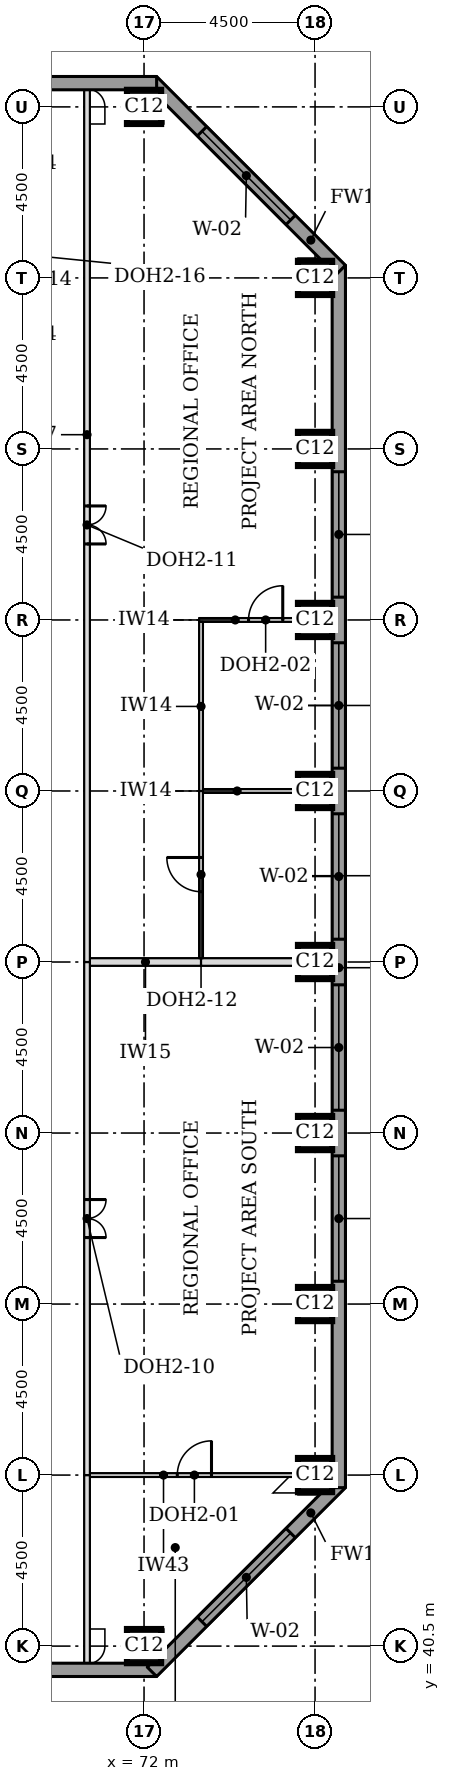
"""IFC4 building model, lengths in metres.
Left out: names, types, materials, properties, quantities, classifications, styles, units other than length and angle.
Written with IfcOpenShell. Run it as: python <this file> out.ifc"""

import sys

from ifc_helpers import new_model, si_unit, direction, frame, frame_2d, origin, origin_2d, place, context, subcontext, project, spatial, rectangle, extrude, element, fill, save


model = new_model("IFC4")
c1 = context("Model", 3, precision=1e-05, world=origin(), true_north=direction((0.0, 1.0)))
c2 = subcontext(c1, "Body", "Model", "MODEL_VIEW")
j1 = project(units=[si_unit("LENGTHUNIT", "METRE"), si_unit("PLANEANGLEUNIT", "RADIAN")], contexts=[c1])
p1 = place(None, origin())
s1 = spatial("IfcSite", under=j1, at=p1, CompositionType="ELEMENT")
p2 = place(p1, origin())
s2 = spatial("IfcBuilding", under=s1, at=p2, CompositionType="ELEMENT")
p3 = place(p2, frame((0.0, 0.0, 158.8)))
s3 = spatial("IfcBuildingStorey", under=s2, at=p3, CompositionType="ELEMENT", Elevation=158.8)
for number, where, z_axis, x_axis in (
    (1, (72.0, 40.5, 0.0), (0.0, 0.0, 1.0), (1.0, 0.0, 0.0)),
    (2, (76.5, 45.0, 0.0), (0.0, 0.0, 1.0), (1.0, 0.0, 0.0)),
    (3, (76.5, 49.5, 0.0), (0.0, 0.0, 1.0), (1.0, 0.0, 0.0)),
    (4, (76.5, 54.0, 0.0), (0.0, 0.0, 1.0), (1.0, 0.0, 0.0)),
    (5, (76.5, 58.5, 0.0), (0.0, 0.0, 1.0), (1.0, 0.0, 0.0)),
    (6, (76.5, 63.0, 0.0), (0.0, 0.0, 1.0), (1.0, 0.0, 0.0)),
    (7, (76.5, 67.5, 0.0), (0.0, 0.0, 1.0), (1.0, 0.0, 0.0)),
    (8, (76.5, 72.0, 0.0), (0.0, 0.0, 1.0), (1.0, 0.0, 0.0)),
    (9, (76.5, 76.5, 0.0), (0.0, 0.0, 1.0), (1.0, 0.0, 0.0)),
    (10, (72.0, 81.0, 0.0), (0.0, 0.0, 1.0), (1.0, 0.0, 0.0)),
):
    element("IfcColumn", number, at=place(p3, frame(where, z_axis=z_axis, x_axis=x_axis)), inside=s3, PredefinedType="COLUMN", context=c2, shape_type="SweptSolid", body=[
        extrude(rectangle(XDim=0.9, YDim=0.9, at=origin_2d()), origin(), (0.0, 0.0, 1.0), 3.7),
    ])
p4 = place(p3, frame((36.0, 39.875, 0.0), z_axis=(0.0, 0.0, 1.0), x_axis=(1.0, 0.0, 0.0)))
e11 = element("IfcWall", 11, at=p4, inside=s3, PredefinedType="STANDARD", context=c2, shape_type="SweptSolid", body=[
    extrude(rectangle(XDim=36.331, YDim=0.35, at=frame_2d((18.166, 0.0))), origin(), (0.0, 0.0, 1.0), 3.525),
])
p5 = place(p4, frame((5.1, 0.0, 0.9)))
e12 = element("IfcOpeningElement", 12, at=p5, cuts=e11, PredefinedType="OPENING", context=c2, shape_type="SweptSolid", body=[
    extrude(rectangle(XDim=3.3, YDim=1.9, at=frame_2d((1.65, 0.95))), frame((0.0, 0.185, 0.0), z_axis=(0.0, -1.0, 0.0), x_axis=(1.0, 0.0, 0.0)), (0.0, 0.0, 1.0), 0.37),
])
p6 = place(p4, frame((9.6, 0.0, 0.9)))
e13 = element("IfcOpeningElement", 13, at=p6, cuts=e11, PredefinedType="OPENING", context=c2, shape_type="SweptSolid", body=[
    extrude(rectangle(XDim=3.3, YDim=1.9, at=frame_2d((1.65, 0.95))), frame((0.0, 0.185, 0.0), z_axis=(0.0, -1.0, 0.0), x_axis=(1.0, 0.0, 0.0)), (0.0, 0.0, 1.0), 0.37),
])
p7 = place(p4, frame((14.1, 0.0, 0.9)))
e14 = element("IfcOpeningElement", 14, at=p7, cuts=e11, PredefinedType="OPENING", context=c2, shape_type="SweptSolid", body=[
    extrude(rectangle(XDim=3.3, YDim=1.9, at=frame_2d((1.65, 0.95))), frame((0.0, 0.185, 0.0), z_axis=(0.0, -1.0, 0.0), x_axis=(1.0, 0.0, 0.0)), (0.0, 0.0, 1.0), 0.37),
])
p8 = place(p4, frame((18.6, 0.0, 0.9)))
e15 = element("IfcOpeningElement", 15, at=p8, cuts=e11, PredefinedType="OPENING", context=c2, shape_type="SweptSolid", body=[
    extrude(rectangle(XDim=3.3, YDim=1.9, at=frame_2d((1.65, 0.95))), frame((0.0, 0.185, 0.0), z_axis=(0.0, -1.0, 0.0), x_axis=(1.0, 0.0, 0.0)), (0.0, 0.0, 1.0), 0.37),
])
p9 = place(p4, frame((23.1, 0.0, 0.9)))
e16 = element("IfcOpeningElement", 16, at=p9, cuts=e11, PredefinedType="OPENING", context=c2, shape_type="SweptSolid", body=[
    extrude(rectangle(XDim=3.3, YDim=1.9, at=frame_2d((1.65, 0.95))), frame((0.0, 0.185, 0.0), z_axis=(0.0, -1.0, 0.0), x_axis=(1.0, 0.0, 0.0)), (0.0, 0.0, 1.0), 0.37),
])
p10 = place(p4, frame((27.6, 0.0, 0.9)))
e17 = element("IfcOpeningElement", 17, at=p10, cuts=e11, PredefinedType="OPENING", context=c2, shape_type="SweptSolid", body=[
    extrude(rectangle(XDim=3.3, YDim=1.9, at=frame_2d((1.65, 0.95))), frame((0.0, 0.185, 0.0), z_axis=(0.0, -1.0, 0.0), x_axis=(1.0, 0.0, 0.0)), (0.0, 0.0, 1.0), 0.37),
])
p11 = place(p3, frame((72.208, 39.824, 0.0), z_axis=(0.0, 0.0, 1.0), x_axis=(0.707106781187, 0.707106781187, 0.0)))
e18 = element("IfcWall", 18, at=p11, inside=s3, PredefinedType="STANDARD", context=c2, shape_type="SweptSolid", body=[
    extrude(rectangle(XDim=7.027, YDim=0.35, at=frame_2d((3.513, 0.0))), origin(), (0.0, 0.0, 1.0), 3.525),
])
p12 = place(p11, frame((1.863, 0.0, 0.9)))
e19 = element("IfcOpeningElement", 19, at=p12, cuts=e18, PredefinedType="OPENING", context=c2, shape_type="SweptSolid", body=[
    extrude(rectangle(XDim=3.3, YDim=1.9, at=frame_2d((1.65, 0.95))), frame((0.0, 0.185, 0.0), z_axis=(0.0, -1.0, 0.0), x_axis=(1.0, 0.0, 0.0)), (0.0, 0.0, 1.0), 0.37),
])
p13 = place(p3, frame((77.125, 44.669, 0.0), z_axis=(0.0, 0.0, 1.0), x_axis=(0.0, 1.0, 0.0)))
e20 = element("IfcWall", 20, at=p13, inside=s3, PredefinedType="STANDARD", context=c2, shape_type="SweptSolid", body=[
    extrude(rectangle(XDim=32.163, YDim=0.35, at=frame_2d((16.081, 0.0))), origin(), (0.0, 0.0, 1.0), 3.525),
])
p14 = place(p13, frame((5.431, 0.0, 0.9)))
e21 = element("IfcOpeningElement", 21, at=p14, cuts=e20, PredefinedType="OPENING", context=c2, shape_type="SweptSolid", body=[
    extrude(rectangle(XDim=3.3, YDim=1.9, at=frame_2d((1.65, 0.95))), frame((0.0, 0.185, 0.0), z_axis=(0.0, -1.0, 0.0), x_axis=(1.0, 0.0, 0.0)), (0.0, 0.0, 1.0), 0.37),
])
p15 = place(p13, frame((9.931, 0.0, 0.9)))
e22 = element("IfcOpeningElement", 22, at=p15, cuts=e20, PredefinedType="OPENING", context=c2, shape_type="SweptSolid", body=[
    extrude(rectangle(XDim=3.3, YDim=1.9, at=frame_2d((1.65, 0.95))), frame((0.0, 0.185, 0.0), z_axis=(0.0, -1.0, 0.0), x_axis=(1.0, 0.0, 0.0)), (0.0, 0.0, 1.0), 0.37),
])
p16 = place(p13, frame((14.431, 0.0, 0.9)))
e23 = element("IfcOpeningElement", 23, at=p16, cuts=e20, PredefinedType="OPENING", context=c2, shape_type="SweptSolid", body=[
    extrude(rectangle(XDim=3.3, YDim=1.9, at=frame_2d((1.65, 0.95))), frame((0.0, 0.185, 0.0), z_axis=(0.0, -1.0, 0.0), x_axis=(1.0, 0.0, 0.0)), (0.0, 0.0, 1.0), 0.37),
])
p17 = place(p13, frame((18.931, 0.0, 0.9)))
e24 = element("IfcOpeningElement", 24, at=p17, cuts=e20, PredefinedType="OPENING", context=c2, shape_type="SweptSolid", body=[
    extrude(rectangle(XDim=3.3, YDim=1.9, at=frame_2d((1.65, 0.95))), frame((0.0, 0.185, 0.0), z_axis=(0.0, -1.0, 0.0), x_axis=(1.0, 0.0, 0.0)), (0.0, 0.0, 1.0), 0.37),
])
p18 = place(p13, frame((23.431, 0.0, 0.9)))
e25 = element("IfcOpeningElement", 25, at=p18, cuts=e20, PredefinedType="OPENING", context=c2, shape_type="SweptSolid", body=[
    extrude(rectangle(XDim=3.3, YDim=1.9, at=frame_2d((1.65, 0.95))), frame((0.0, 0.185, 0.0), z_axis=(0.0, -1.0, 0.0), x_axis=(1.0, 0.0, 0.0)), (0.0, 0.0, 1.0), 0.37),
])
p19 = place(p3, frame((77.176, 76.708, 0.0), z_axis=(0.0, 0.0, 1.0), x_axis=(-0.707106781187, 0.707106781187, 0.0)))
e26 = element("IfcWall", 26, at=p19, inside=s3, PredefinedType="STANDARD", context=c2, shape_type="SweptSolid", body=[
    extrude(rectangle(XDim=7.027, YDim=0.35, at=frame_2d((3.513, 0.0))), origin(), (0.0, 0.0, 1.0), 3.525),
])
p20 = place(p19, frame((1.863, 0.0, 0.9)))
e27 = element("IfcOpeningElement", 27, at=p20, cuts=e26, PredefinedType="OPENING", context=c2, shape_type="SweptSolid", body=[
    extrude(rectangle(XDim=3.3, YDim=1.9, at=frame_2d((1.65, 0.95))), frame((0.0, 0.185, 0.0), z_axis=(0.0, -1.0, 0.0), x_axis=(1.0, 0.0, 0.0)), (0.0, 0.0, 1.0), 0.37),
])
p21 = place(p3, frame((72.331, 81.625, 0.0), z_axis=(0.0, 0.0, 1.0), x_axis=(-1.0, 0.0, 0.0)))
e28 = element("IfcWall", 28, at=p21, inside=s3, PredefinedType="STANDARD", context=c2, shape_type="SweptSolid", body=[
    extrude(rectangle(XDim=32.163, YDim=0.35, at=frame_2d((16.081, 0.0))), origin(), (0.0, 0.0, 1.0), 3.525),
])
p22 = place(p21, frame((5.431, 0.0, 0.9)))
e29 = element("IfcOpeningElement", 29, at=p22, cuts=e28, PredefinedType="OPENING", context=c2, shape_type="SweptSolid", body=[
    extrude(rectangle(XDim=3.3, YDim=1.9, at=frame_2d((1.65, 0.95))), frame((0.0, 0.185, 0.0), z_axis=(0.0, -1.0, 0.0), x_axis=(1.0, 0.0, 0.0)), (0.0, 0.0, 1.0), 0.37),
])
p23 = place(p21, frame((9.931, 0.0, 0.9)))
e30 = element("IfcOpeningElement", 30, at=p23, cuts=e28, PredefinedType="OPENING", context=c2, shape_type="SweptSolid", body=[
    extrude(rectangle(XDim=3.3, YDim=1.9, at=frame_2d((1.65, 0.95))), frame((0.0, 0.185, 0.0), z_axis=(0.0, -1.0, 0.0), x_axis=(1.0, 0.0, 0.0)), (0.0, 0.0, 1.0), 0.37),
])
p24 = place(p21, frame((14.431, 0.0, 0.9)))
e31 = element("IfcOpeningElement", 31, at=p24, cuts=e28, PredefinedType="OPENING", context=c2, shape_type="SweptSolid", body=[
    extrude(rectangle(XDim=3.3, YDim=1.9, at=frame_2d((1.65, 0.95))), frame((0.0, 0.185, 0.0), z_axis=(0.0, -1.0, 0.0), x_axis=(1.0, 0.0, 0.0)), (0.0, 0.0, 1.0), 0.37),
])
p25 = place(p21, frame((18.931, 0.0, 0.9)))
e32 = element("IfcOpeningElement", 32, at=p25, cuts=e28, PredefinedType="OPENING", context=c2, shape_type="SweptSolid", body=[
    extrude(rectangle(XDim=3.3, YDim=1.9, at=frame_2d((1.65, 0.95))), frame((0.0, 0.185, 0.0), z_axis=(0.0, -1.0, 0.0), x_axis=(1.0, 0.0, 0.0)), (0.0, 0.0, 1.0), 0.37),
])
p26 = place(p21, frame((23.431, 0.0, 0.9)))
e33 = element("IfcOpeningElement", 33, at=p26, cuts=e28, PredefinedType="OPENING", context=c2, shape_type="SweptSolid", body=[
    extrude(rectangle(XDim=3.3, YDim=1.9, at=frame_2d((1.65, 0.95))), frame((0.0, 0.185, 0.0), z_axis=(0.0, -1.0, 0.0), x_axis=(1.0, 0.0, 0.0)), (0.0, 0.0, 1.0), 0.37),
])
p27 = place(p3, frame((70.575, 45.0, 0.0), z_axis=(0.0, 0.0, 1.0), x_axis=(1.0, 0.0, 0.0)))
e34 = element("IfcWall", 34, at=p27, inside=s3, PredefinedType="PARTITIONING", context=c2, shape_type="SweptSolid", body=[
    extrude(rectangle(XDim=5.475, YDim=0.1, at=frame_2d((2.738, 0.0))), origin(), (0.0, 0.0, 1.0), 3.096),
])
p28 = place(p27, frame((2.3, 0.0, 0.0)))
e35 = element("IfcOpeningElement", 35, at=p28, cuts=e34, PredefinedType="OPENING", context=c2, shape_type="SweptSolid", body=[
    extrude(rectangle(XDim=0.9, YDim=2.1, at=frame_2d((0.45, 1.05))), frame((0.0, 0.06, 0.0), z_axis=(0.0, -1.0, 0.0), x_axis=(1.0, 0.0, 0.0)), (0.0, 0.0, 1.0), 0.12),
])
p29 = place(p3, frame((70.575, 58.5, 0.0), z_axis=(0.0, 0.0, 1.0), x_axis=(1.0, 0.0, 0.0)))
e36 = element("IfcWall", 36, at=p29, inside=s3, PredefinedType="PARTITIONING", context=c2, shape_type="SweptSolid", body=[
    extrude(rectangle(XDim=2.925, YDim=0.2, at=frame_2d((1.462, 0.0))), origin(), (0.0, 0.0, 1.0), 3.55),
])
p30 = place(p3, frame((73.5, 58.5, 0.0), z_axis=(0.0, 0.0, 1.0), x_axis=(1.0, 0.0, 0.0)))
e37 = element("IfcWall", 37, at=p30, inside=s3, PredefinedType="PARTITIONING", context=c2, shape_type="SweptSolid", body=[
    extrude(rectangle(XDim=3.45, YDim=0.2, at=frame_2d((1.725, 0.0))), origin(), (0.0, 0.0, 1.0), 3.55),
])
p31 = place(p3, frame((73.55, 63.0, 0.0), z_axis=(0.0, 0.0, 1.0), x_axis=(1.0, 0.0, 0.0)))
e38 = element("IfcWall", 38, at=p31, inside=s3, PredefinedType="PARTITIONING", context=c2, shape_type="SweptSolid", body=[
    extrude(rectangle(XDim=3.4, YDim=0.1, at=frame_2d((1.7, 0.0))), origin(), (0.0, 0.0, 1.0), 3.55),
])
p32 = place(p3, frame((73.45, 67.5, 0.0), z_axis=(0.0, 0.0, 1.0), x_axis=(1.0, 0.0, 0.0)))
e39 = element("IfcWall", 39, at=p32, inside=s3, PredefinedType="PARTITIONING", context=c2, shape_type="SweptSolid", body=[
    extrude(rectangle(XDim=3.5, YDim=0.1, at=frame_2d((1.75, 0.0))), origin(), (0.0, 0.0, 1.0), 3.55),
])
p33 = place(p32, frame((1.3, 0.0, 0.0)))
e40 = element("IfcOpeningElement", 40, at=p33, cuts=e39, PredefinedType="OPENING", context=c2, shape_type="SweptSolid", body=[
    extrude(rectangle(XDim=0.9, YDim=2.1, at=frame_2d((0.45, 1.05))), frame((0.0, 0.06, 0.0), z_axis=(0.0, -1.0, 0.0), x_axis=(1.0, 0.0, 0.0)), (0.0, 0.0, 1.0), 0.12),
])
p34 = place(p3, frame((70.5, 40.05, 0.0), z_axis=(0.0, 0.0, 1.0), x_axis=(0.0, 1.0, 0.0)))
e41 = element("IfcWall", 41, at=p34, inside=s3, PredefinedType="PARTITIONING", context=c2, shape_type="SweptSolid", body=[
    extrude(rectangle(XDim=4.95, YDim=0.15, at=frame_2d((2.475, 0.0))), origin(), (0.0, 0.0, 1.0), 3.55),
])
p35 = place(p3, frame((70.5, 45.0, 0.0), z_axis=(0.0, 0.0, 1.0), x_axis=(0.0, 1.0, 0.0)))
e42 = element("IfcWall", 42, at=p35, inside=s3, PredefinedType="PARTITIONING", context=c2, shape_type="SweptSolid", body=[
    extrude(rectangle(XDim=13.5, YDim=0.15, at=frame_2d((6.75, 0.0))), origin(), (0.0, 0.0, 1.0), 3.55),
])
p36 = place(p35, frame((6.25, 0.0, 0.0)))
e43 = element("IfcOpeningElement", 43, at=p36, cuts=e42, PredefinedType="OPENING", context=c2, shape_type="SweptSolid", body=[
    extrude(rectangle(XDim=1.0, YDim=2.1, at=frame_2d((0.5, 1.05))), frame((0.0, 0.085, 0.0), z_axis=(0.0, -1.0, 0.0), x_axis=(1.0, 0.0, 0.0)), (0.0, 0.0, 1.0), 0.17),
])
p37 = place(p3, frame((70.5, 58.5, 0.0), z_axis=(0.0, 0.0, 1.0), x_axis=(0.0, 1.0, 0.0)))
e44 = element("IfcWall", 44, at=p37, inside=s3, PredefinedType="PARTITIONING", context=c2, shape_type="SweptSolid", body=[
    extrude(rectangle(XDim=22.95, YDim=0.15, at=frame_2d((11.475, 0.0))), origin(), (0.0, 0.0, 1.0), 3.55),
])
p38 = place(p37, frame((11.0, 0.0, 0.0)))
e45 = element("IfcOpeningElement", 45, at=p38, cuts=e44, PredefinedType="OPENING", context=c2, shape_type="SweptSolid", body=[
    extrude(rectangle(XDim=1.0, YDim=2.1, at=frame_2d((0.5, 1.05))), frame((0.0, 0.085, 0.0), z_axis=(0.0, -1.0, 0.0), x_axis=(1.0, 0.0, 0.0)), (0.0, 0.0, 1.0), 0.17),
])
p39 = place(p3, frame((73.5, 58.6, 0.0), z_axis=(0.0, 0.0, 1.0), x_axis=(0.0, 1.0, 0.0)))
e46 = element("IfcWall", 46, at=p39, inside=s3, PredefinedType="PARTITIONING", context=c2, shape_type="SweptSolid", body=[
    extrude(rectangle(XDim=4.4, YDim=0.1, at=frame_2d((2.2, 0.0))), origin(), (0.0, 0.0, 1.0), 3.55),
])
p40 = place(p39, frame((1.75, 0.0, 0.0)))
e47 = element("IfcOpeningElement", 47, at=p40, cuts=e46, PredefinedType="OPENING", context=c2, shape_type="SweptSolid", body=[
    extrude(rectangle(XDim=0.9, YDim=2.1, at=frame_2d((0.45, 1.05))), frame((0.0, 0.06, 0.0), z_axis=(0.0, -1.0, 0.0), x_axis=(1.0, 0.0, 0.0)), (0.0, 0.0, 1.0), 0.12),
])
p41 = place(p3, frame((73.5, 63.0, 0.0), z_axis=(0.0, 0.0, 1.0), x_axis=(0.0, 1.0, 0.0)))
e48 = element("IfcWall", 48, at=p41, inside=s3, PredefinedType="PARTITIONING", context=c2, shape_type="SweptSolid", body=[
    extrude(rectangle(XDim=4.45, YDim=0.1, at=frame_2d((2.225, 0.0))), origin(), (0.0, 0.0, 1.0), 3.55),
])
p42 = place(p12, origin())
e49 = element("IfcWindow", 49, at=p42, inside=s3, PartitioningType="SINGLE_PANEL", PredefinedType="WINDOW", context=c2, shape_type="SweptSolid", body=[
    extrude(rectangle(XDim=3.3, YDim=1.9, at=frame_2d((1.65, 0.95))), frame((0.0, 0.085, 0.0), z_axis=(0.0, -1.0, 0.0), x_axis=(1.0, 0.0, 0.0)), (0.0, 0.0, 1.0), 0.06),
])
fill(e19, e49)
p43 = place(p14, origin())
e50 = element("IfcWindow", 50, at=p43, inside=s3, PartitioningType="SINGLE_PANEL", PredefinedType="WINDOW", context=c2, shape_type="SweptSolid", body=[
    extrude(rectangle(XDim=3.3, YDim=1.9, at=frame_2d((1.65, 0.95))), frame((0.0, 0.085, 0.0), z_axis=(0.0, -1.0, 0.0), x_axis=(1.0, 0.0, 0.0)), (0.0, 0.0, 1.0), 0.06),
])
fill(e21, e50)
p44 = place(p15, origin())
e51 = element("IfcWindow", 51, at=p44, inside=s3, PartitioningType="SINGLE_PANEL", PredefinedType="WINDOW", context=c2, shape_type="SweptSolid", body=[
    extrude(rectangle(XDim=3.3, YDim=1.9, at=frame_2d((1.65, 0.95))), frame((0.0, 0.085, 0.0), z_axis=(0.0, -1.0, 0.0), x_axis=(1.0, 0.0, 0.0)), (0.0, 0.0, 1.0), 0.06),
])
fill(e22, e51)
p45 = place(p16, origin())
e52 = element("IfcWindow", 52, at=p45, inside=s3, PartitioningType="SINGLE_PANEL", PredefinedType="WINDOW", context=c2, shape_type="SweptSolid", body=[
    extrude(rectangle(XDim=3.3, YDim=1.9, at=frame_2d((1.65, 0.95))), frame((0.0, 0.085, 0.0), z_axis=(0.0, -1.0, 0.0), x_axis=(1.0, 0.0, 0.0)), (0.0, 0.0, 1.0), 0.06),
])
fill(e23, e52)
p46 = place(p17, origin())
e53 = element("IfcWindow", 53, at=p46, inside=s3, PartitioningType="SINGLE_PANEL", PredefinedType="WINDOW", context=c2, shape_type="SweptSolid", body=[
    extrude(rectangle(XDim=3.3, YDim=1.9, at=frame_2d((1.65, 0.95))), frame((0.0, 0.085, 0.0), z_axis=(0.0, -1.0, 0.0), x_axis=(1.0, 0.0, 0.0)), (0.0, 0.0, 1.0), 0.06),
])
fill(e24, e53)
p47 = place(p18, origin())
e54 = element("IfcWindow", 54, at=p47, inside=s3, PartitioningType="SINGLE_PANEL", PredefinedType="WINDOW", context=c2, shape_type="SweptSolid", body=[
    extrude(rectangle(XDim=3.3, YDim=1.9, at=frame_2d((1.65, 0.95))), frame((0.0, 0.085, 0.0), z_axis=(0.0, -1.0, 0.0), x_axis=(1.0, 0.0, 0.0)), (0.0, 0.0, 1.0), 0.06),
])
fill(e25, e54)
p48 = place(p20, origin())
e55 = element("IfcWindow", 55, at=p48, inside=s3, PartitioningType="SINGLE_PANEL", PredefinedType="WINDOW", context=c2, shape_type="SweptSolid", body=[
    extrude(rectangle(XDim=3.3, YDim=1.9, at=frame_2d((1.65, 0.95))), frame((0.0, 0.085, 0.0), z_axis=(0.0, -1.0, 0.0), x_axis=(1.0, 0.0, 0.0)), (0.0, 0.0, 1.0), 0.06),
])
fill(e27, e55)
p49 = place(p36, frame((1.0, 0.0, 0.0), z_axis=(0.0, 0.0, 1.0), x_axis=(-1.0, 0.0, 0.0)))
e56 = element("IfcDoor", 56, at=p49, inside=s3, OperationType="DOUBLE_DOOR_SINGLE_SWING", PredefinedType="DOOR", context=c2, shape_type="SweptSolid", body=[
    extrude(rectangle(XDim=1.0, YDim=2.1, at=frame_2d((0.5, 1.05))), frame((0.0, 0.025, 0.0), z_axis=(0.0, -1.0, 0.0), x_axis=(1.0, 0.0, 0.0)), (0.0, 0.0, 1.0), 0.05),
])
fill(e43, e56)
p50 = place(p28, origin())
e57 = element("IfcDoor", 57, at=p50, inside=s3, OperationType="SINGLE_SWING_RIGHT", PredefinedType="DOOR", context=c2, shape_type="SweptSolid", body=[
    extrude(rectangle(XDim=0.9, YDim=2.1, at=frame_2d((0.45, 1.05))), frame((0.0, 0.025, 0.0), z_axis=(0.0, -1.0, 0.0), x_axis=(1.0, 0.0, 0.0)), (0.0, 0.0, 1.0), 0.05),
])
fill(e35, e57)
p51 = place(p38, frame((1.0, 0.0, 0.0), z_axis=(0.0, 0.0, 1.0), x_axis=(-1.0, 0.0, 0.0)))
e58 = element("IfcDoor", 58, at=p51, inside=s3, OperationType="DOUBLE_DOOR_SINGLE_SWING", PredefinedType="DOOR", context=c2, shape_type="SweptSolid", body=[
    extrude(rectangle(XDim=1.0, YDim=2.1, at=frame_2d((0.5, 1.05))), frame((0.0, 0.025, 0.0), z_axis=(0.0, -1.0, 0.0), x_axis=(1.0, 0.0, 0.0)), (0.0, 0.0, 1.0), 0.05),
])
fill(e45, e58)
p52 = place(p40, origin())
e59 = element("IfcDoor", 59, at=p52, inside=s3, OperationType="SINGLE_SWING_RIGHT", PredefinedType="DOOR", context=c2, shape_type="SweptSolid", body=[
    extrude(rectangle(XDim=0.9, YDim=2.1, at=frame_2d((0.45, 1.05))), frame((0.0, 0.025, 0.0), z_axis=(0.0, -1.0, 0.0), x_axis=(1.0, 0.0, 0.0)), (0.0, 0.0, 1.0), 0.05),
])
fill(e47, e59)
p53 = place(p33, origin())
e60 = element("IfcDoor", 60, at=p53, inside=s3, OperationType="SINGLE_SWING_RIGHT", PredefinedType="DOOR", context=c2, shape_type="SweptSolid", body=[
    extrude(rectangle(XDim=0.9, YDim=2.1, at=frame_2d((0.45, 1.05))), frame((0.0, 0.025, 0.0), z_axis=(0.0, -1.0, 0.0), x_axis=(1.0, 0.0, 0.0)), (0.0, 0.0, 1.0), 0.05),
])
fill(e40, e60)
save(model, sys.argv[1])
